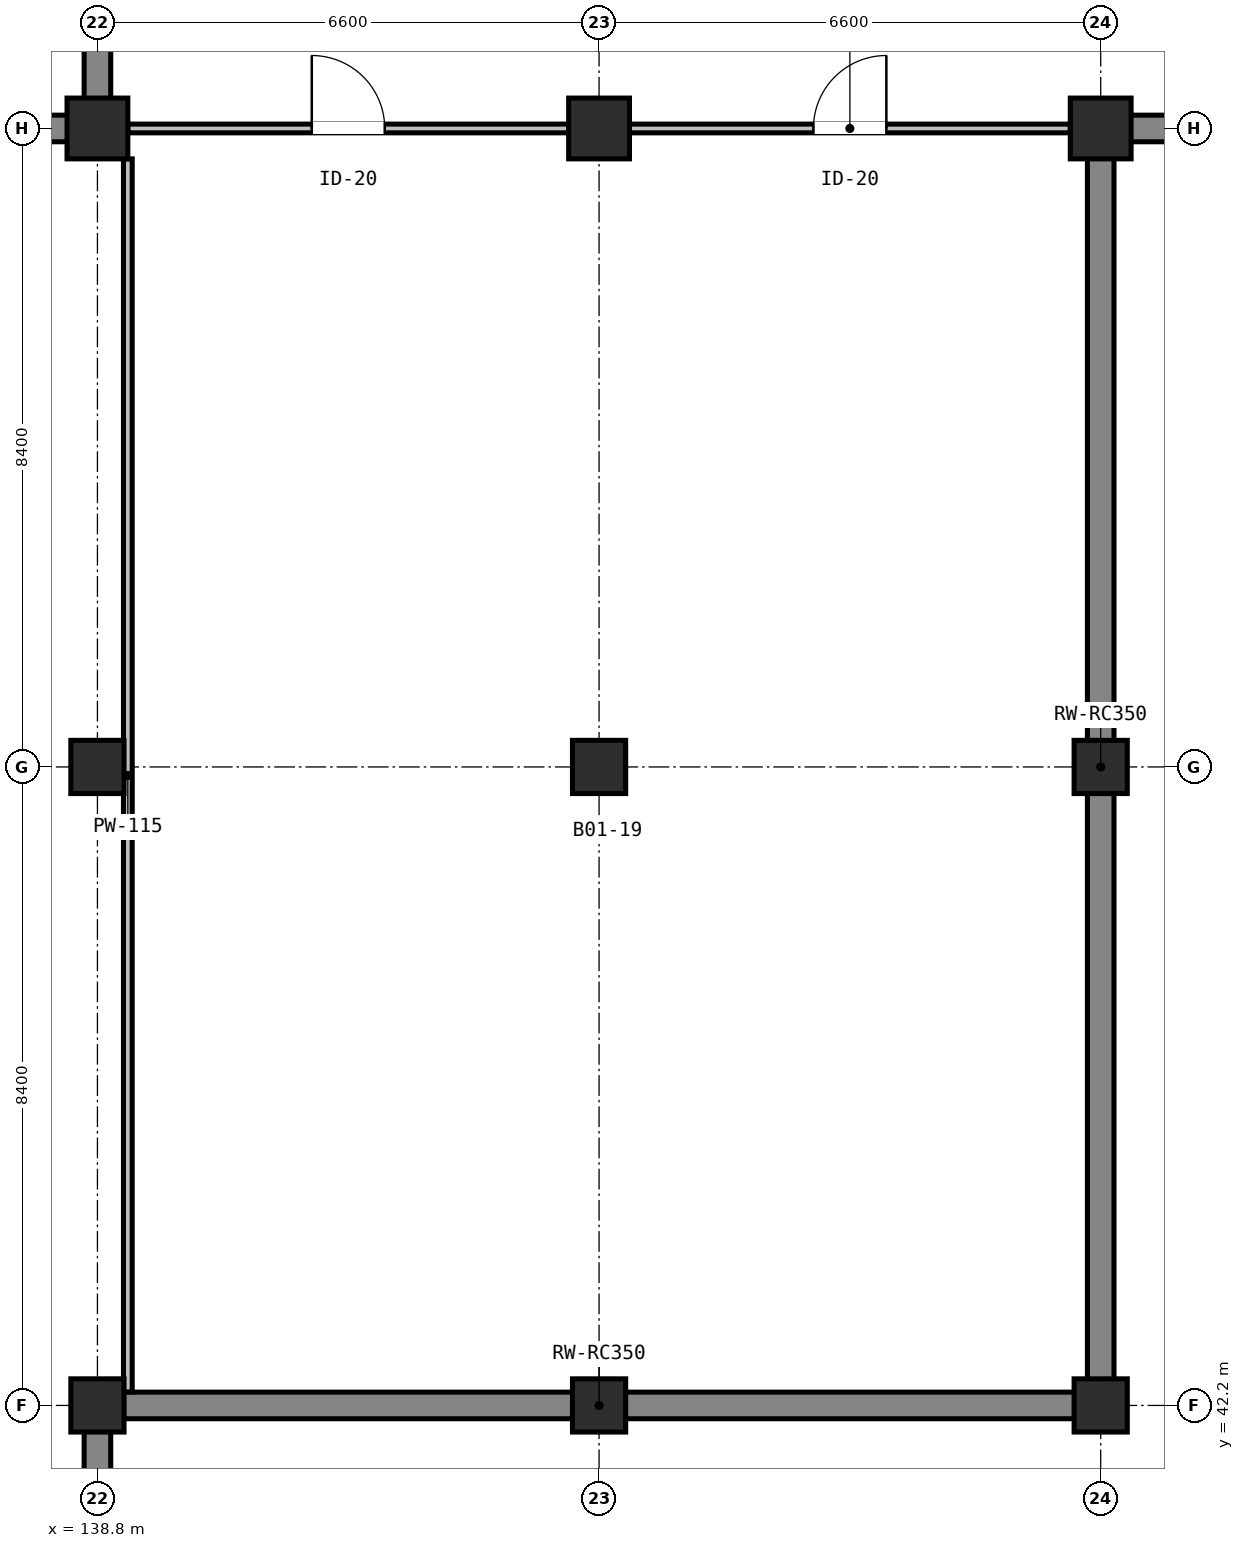
"""IFC4 building model, lengths in metres.
Left out: names, types, materials, properties, quantities, classifications, styles, units other than length and angle.
Written with IfcOpenShell. Run it as: python <this file> out.ifc"""

import sys

from ifc_helpers import new_model, si_unit, direction, frame, frame_2d, origin, origin_2d, place, context, subcontext, project, spatial, rectangle, extrude, element, fill, save


model = new_model("IFC4")
c1 = context("Model", 3, precision=1e-05, world=origin(), true_north=direction((0.0, 1.0)))
c2 = subcontext(c1, "Body", "Model", "MODEL_VIEW")
j1 = project(units=[si_unit("LENGTHUNIT", "METRE"), si_unit("PLANEANGLEUNIT", "RADIAN")], contexts=[c1])
p1 = place(None, origin())
s1 = spatial("IfcSite", under=j1, at=p1, CompositionType="ELEMENT")
p2 = place(p1, origin())
s2 = spatial("IfcBuilding", under=s1, at=p2, CompositionType="ELEMENT")
p3 = place(p2, frame((0.0, 0.0, -4.5)))
s3 = spatial("IfcBuildingStorey", under=s2, at=p3, CompositionType="ELEMENT", Elevation=-4.5)
for number, where, z_axis, x_axis in (
    (1, (138.8, 42.2, 0.0), (0.0, 0.0, 1.0), (1.0, 0.0, 0.0)),
    (2, (138.8, 50.6, 0.0), (0.0, 0.0, 1.0), (1.0, 0.0, 0.0)),
):
    element("IfcColumn", number, at=place(p3, frame(where, z_axis=z_axis, x_axis=x_axis)), inside=s3, PredefinedType="COLUMN", context=c2, shape_type="SweptSolid", body=[
        extrude(rectangle(XDim=0.7, YDim=0.7, at=origin_2d()), origin(), (0.0, 0.0, 1.0), 4.5),
    ])
p4 = place(p3, frame((138.8, 59.0, 0.0), z_axis=(0.0, 0.0, 1.0), x_axis=(1.0, 0.0, 0.0)))
e3 = element("IfcColumn", 3, at=p4, inside=s3, PredefinedType="COLUMN", context=c2, shape_type="SweptSolid", body=[
    extrude(rectangle(XDim=0.8, YDim=0.8, at=origin_2d()), origin(), (0.0, 0.0, 1.0), 4.5),
])
for number, where, z_axis, x_axis in (
    (4, (145.4, 42.2, 0.0), (0.0, 0.0, 1.0), (1.0, 0.0, 0.0)),
    (5, (145.4, 50.6, 0.0), (0.0, 0.0, 1.0), (1.0, 0.0, 0.0)),
):
    element("IfcColumn", number, at=place(p3, frame(where, z_axis=z_axis, x_axis=x_axis)), inside=s3, PredefinedType="COLUMN", context=c2, shape_type="SweptSolid", body=[
        extrude(rectangle(XDim=0.7, YDim=0.7, at=origin_2d()), origin(), (0.0, 0.0, 1.0), 4.5),
    ])
p5 = place(p3, frame((145.4, 59.0, 0.0), z_axis=(0.0, 0.0, 1.0), x_axis=(1.0, 0.0, 0.0)))
e6 = element("IfcColumn", 6, at=p5, inside=s3, PredefinedType="COLUMN", context=c2, shape_type="SweptSolid", body=[
    extrude(rectangle(XDim=0.8, YDim=0.8, at=origin_2d()), origin(), (0.0, 0.0, 1.0), 4.5),
])
for number, where, z_axis, x_axis in (
    (7, (152.0, 42.2, 0.0), (0.0, 0.0, 1.0), (1.0, 0.0, 0.0)),
    (8, (152.0, 50.6, 0.0), (0.0, 0.0, 1.0), (1.0, 0.0, 0.0)),
):
    element("IfcColumn", number, at=place(p3, frame(where, z_axis=z_axis, x_axis=x_axis)), inside=s3, PredefinedType="COLUMN", context=c2, shape_type="SweptSolid", body=[
        extrude(rectangle(XDim=0.7, YDim=0.7, at=origin_2d()), origin(), (0.0, 0.0, 1.0), 4.5),
    ])
p6 = place(p3, frame((152.0, 59.0, 0.0), z_axis=(0.0, 0.0, 1.0), x_axis=(1.0, 0.0, 0.0)))
e9 = element("IfcColumn", 9, at=p6, inside=s3, PredefinedType="COLUMN", context=c2, shape_type="SweptSolid", body=[
    extrude(rectangle(XDim=0.8, YDim=0.8, at=origin_2d()), origin(), (0.0, 0.0, 1.0), 4.5),
])
p7 = place(p3, frame((132.025, 59.0, 0.0), z_axis=(0.0, 0.0, 1.0), x_axis=(1.0, 0.0, 0.0)))
e10 = element("IfcWall", 10, at=p7, inside=s3, PredefinedType="SOLIDWALL", context=c2, shape_type="SweptSolid", body=[
    extrude(rectangle(XDim=6.95, YDim=0.35, at=frame_2d((3.475, 0.0))), origin(), (0.0, 0.0, 1.0), 4.5),
])
p8 = place(p3, frame((138.8, 59.175, 0.0), z_axis=(0.0, 0.0, 1.0), x_axis=(0.0, 1.0, 0.0)))
e11 = element("IfcWall", 11, at=p8, inside=s3, PredefinedType="SOLIDWALL", context=c2, shape_type="SweptSolid", body=[
    extrude(rectangle(XDim=24.85, YDim=0.35, at=frame_2d((12.425, 0.0))), origin(), (0.0, 0.0, 1.0), 4.5),
])
p9 = place(p3, frame((151.825, 59.0, 0.0), z_axis=(0.0, 0.0, 1.0), x_axis=(1.0, 0.0, 0.0)))
e12 = element("IfcWall", 12, at=p9, inside=s3, PredefinedType="SOLIDWALL", context=c2, shape_type="SweptSolid", body=[
    extrude(rectangle(XDim=20.35, YDim=0.35, at=frame_2d((10.175, 0.0))), origin(), (0.0, 0.0, 1.0), 4.5),
])
p10 = place(p3, frame((152.0, 42.375, 0.0), z_axis=(0.0, 0.0, 1.0), x_axis=(0.0, 1.0, 0.0)))
e13 = element("IfcWall", 13, at=p10, inside=s3, PredefinedType="SOLIDWALL", context=c2, shape_type="SweptSolid", body=[
    extrude(rectangle(XDim=16.45, YDim=0.35, at=frame_2d((8.225, 0.0))), origin(), (0.0, 0.0, 1.0), 4.5),
])
p11 = place(p3, frame((138.625, 42.2, 0.0), z_axis=(0.0, 0.0, 1.0), x_axis=(1.0, 0.0, 0.0)))
e14 = element("IfcWall", 14, at=p11, inside=s3, PredefinedType="SOLIDWALL", context=c2, shape_type="SweptSolid", body=[
    extrude(rectangle(XDim=13.55, YDim=0.35, at=frame_2d((6.775, 0.0))), origin(), (0.0, 0.0, 1.0), 4.5),
])
p12 = place(p3, frame((138.8, 25.575, 0.0), z_axis=(0.0, 0.0, 1.0), x_axis=(0.0, 1.0, 0.0)))
e15 = element("IfcWall", 15, at=p12, inside=s3, PredefinedType="SOLIDWALL", context=c2, shape_type="SweptSolid", body=[
    extrude(rectangle(XDim=16.45, YDim=0.35, at=frame_2d((8.225, 0.0))), origin(), (0.0, 0.0, 1.0), 4.5),
])
p13 = place(p3, frame((139.2, 42.377, 0.0), z_axis=(0.0, 0.0, 1.0), x_axis=(0.0, 1.0, 0.0)))
e16 = element("IfcWall", 16, at=p13, inside=s3, PredefinedType="PARTITIONING", context=c2, shape_type="SweptSolid", body=[
    extrude(rectangle(XDim=16.223, YDim=0.115, at=frame_2d((8.112, 0.0))), origin(), (0.0, 0.0, 1.0), 3.835),
])
p14 = place(p3, frame((139.2, 59.0, 0.0), z_axis=(0.0, 0.0, 1.0), x_axis=(1.0, 0.0, 0.0)))
e17 = element("IfcWall", 17, at=p14, inside=s3, PredefinedType="PARTITIONING", context=c2, shape_type="SweptSolid", body=[
    extrude(rectangle(XDim=5.8, YDim=0.115, at=frame_2d((2.9, 0.0))), origin(), (0.0, 0.0, 1.0), 3.835),
])
p15 = place(p14, frame((2.42, 0.0, 0.0)))
e18 = element("IfcOpeningElement", 18, at=p15, cuts=e17, PredefinedType="OPENING", context=c2, shape_type="SweptSolid", body=[
    extrude(rectangle(XDim=0.96, YDim=2.14, at=frame_2d((0.48, 1.07))), frame((0.0, 0.067, 0.0), z_axis=(0.0, -1.0, 0.0), x_axis=(1.0, 0.0, 0.0)), (0.0, 0.0, 1.0), 0.135),
])
p16 = place(p3, frame((145.8, 59.0, 0.0), z_axis=(0.0, 0.0, 1.0), x_axis=(1.0, 0.0, 0.0)))
e19 = element("IfcWall", 19, at=p16, inside=s3, PredefinedType="PARTITIONING", context=c2, shape_type="SweptSolid", body=[
    extrude(rectangle(XDim=5.8, YDim=0.115, at=frame_2d((2.9, 0.0))), origin(), (0.0, 0.0, 1.0), 3.835),
])
p17 = place(p16, frame((2.42, 0.0, 0.0)))
e20 = element("IfcOpeningElement", 20, at=p17, cuts=e19, PredefinedType="OPENING", context=c2, shape_type="SweptSolid", body=[
    extrude(rectangle(XDim=0.96, YDim=2.14, at=frame_2d((0.48, 1.07))), frame((0.0, 0.067, 0.0), z_axis=(0.0, -1.0, 0.0), x_axis=(1.0, 0.0, 0.0)), (0.0, 0.0, 1.0), 0.135),
])
p18 = place(p17, origin())
e21 = element("IfcDoor", 21, at=p18, inside=s3, OperationType="SINGLE_SWING_RIGHT", PredefinedType="DOOR", context=c2, shape_type="SweptSolid", body=[
    extrude(rectangle(XDim=0.96, YDim=2.14, at=frame_2d((0.48, 1.07))), frame((0.0, 0.025, 0.0), z_axis=(0.0, -1.0, 0.0), x_axis=(1.0, 0.0, 0.0)), (0.0, 0.0, 1.0), 0.05),
])
fill(e20, e21)
p19 = place(p15, origin())
e22 = element("IfcDoor", 22, at=p19, inside=s3, OperationType="SINGLE_SWING_LEFT", PredefinedType="DOOR", context=c2, shape_type="SweptSolid", body=[
    extrude(rectangle(XDim=0.96, YDim=2.14, at=frame_2d((0.48, 1.07))), frame((0.0, 0.025, 0.0), z_axis=(0.0, -1.0, 0.0), x_axis=(1.0, 0.0, 0.0)), (0.0, 0.0, 1.0), 0.05),
])
fill(e18, e22)
save(model, sys.argv[1])
